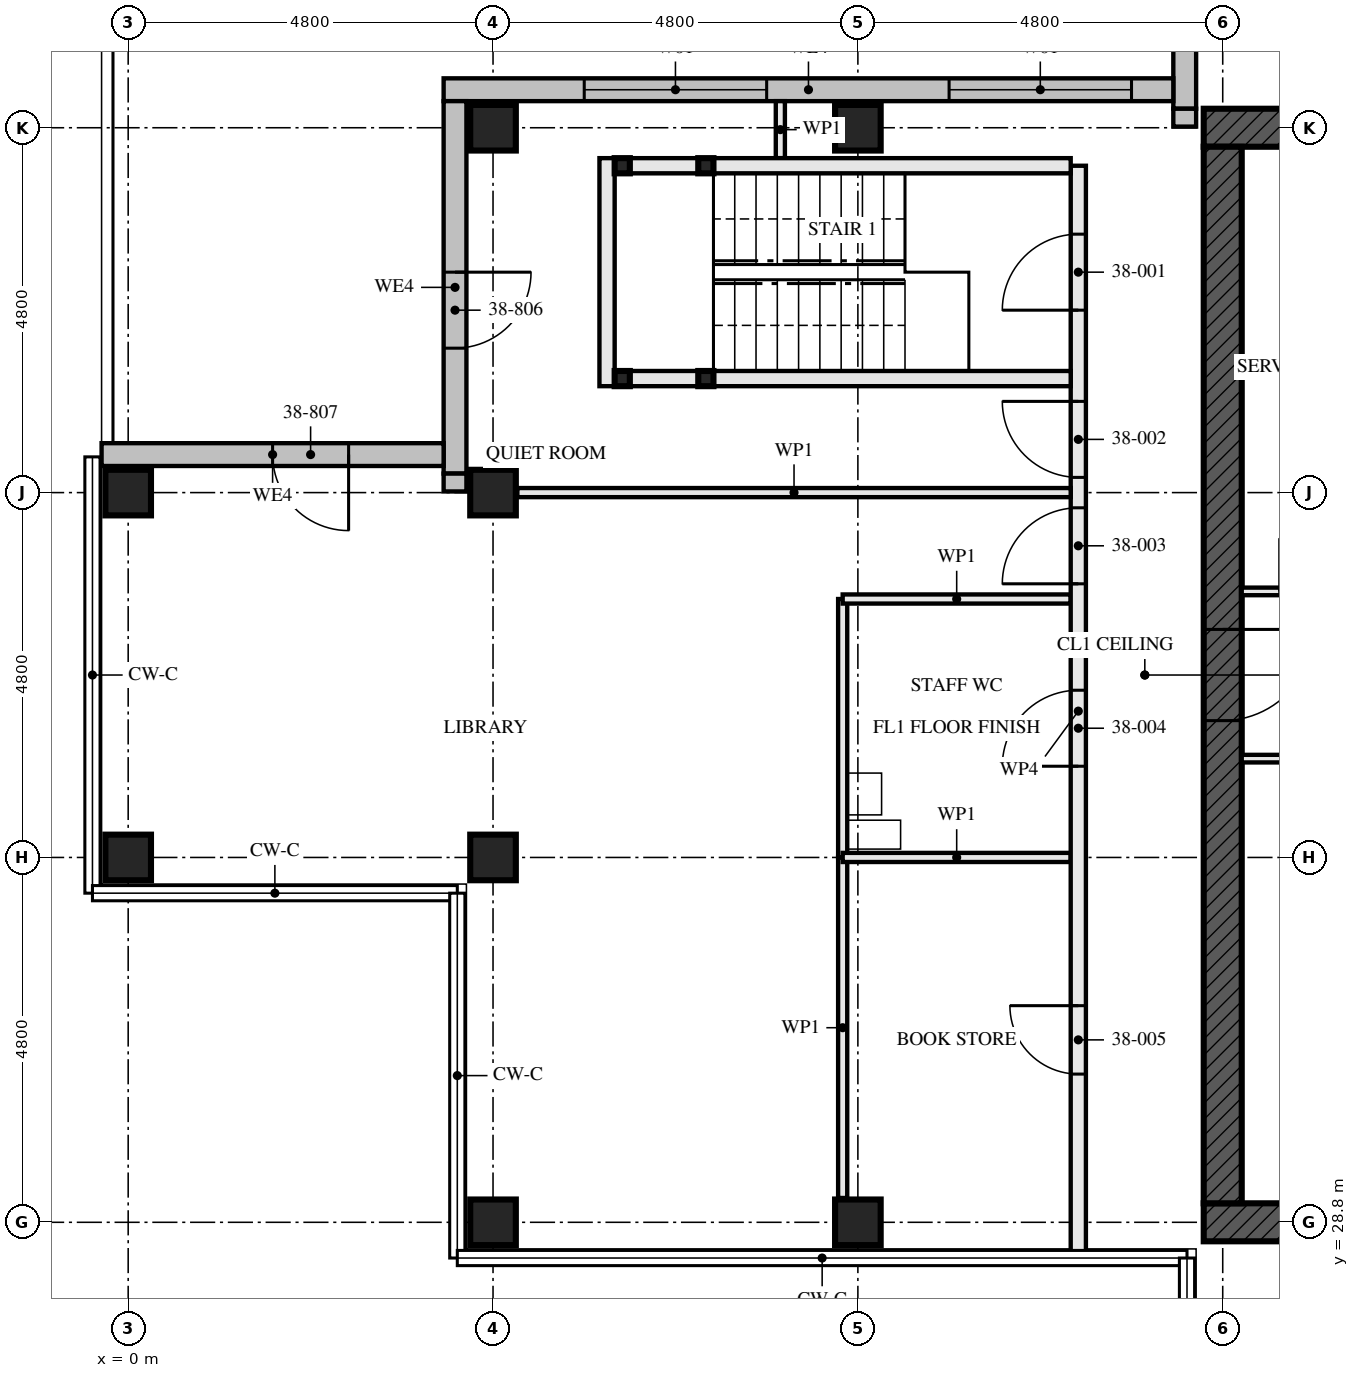
"""IFC4 building model, lengths in metres.
Left out: names, types, materials, properties, quantities, classifications, styles, units other than length and angle.
Written with IfcOpenShell. Run it as: python <this file> out.ifc"""

import sys

from ifc_helpers import new_model, si_unit, direction, frame, frame_2d, origin, origin_2d, place, context, subcontext, project, spatial, rectangle, hollow_rectangle, extrude, element, fill, save


model = new_model("IFC4")
c1 = context("Model", 3, precision=1e-05, world=origin(), true_north=direction((0.0, 1.0)))
c2 = subcontext(c1, "Body", "Model", "MODEL_VIEW")
j1 = project(units=[si_unit("LENGTHUNIT", "METRE"), si_unit("PLANEANGLEUNIT", "RADIAN")], contexts=[c1])
p1 = place(None, origin())
s1 = spatial("IfcSite", under=j1, at=p1, CompositionType="ELEMENT")
p2 = place(p1, origin())
s2 = spatial("IfcBuilding", under=s1, at=p2, CompositionType="ELEMENT")
p3 = place(p2, frame((0.0, 0.0, 141.0)))
s3 = spatial("IfcBuildingStorey", under=s2, at=p3, CompositionType="ELEMENT", Elevation=141.0)
for number, where, z_axis, x_axis in (
    (1, (0.0, 33.6, 0.0), (0.0, 0.0, 1.0), (0.0, 1.0, 0.0)),
    (2, (0.0, 38.4, 0.0), (0.0, 0.0, 1.0), (0.0, 1.0, 0.0)),
    (3, (4.8, 28.8, 0.0), (0.0, 0.0, 1.0), (0.0, 1.0, 0.0)),
    (4, (4.8, 33.6, 0.0), (0.0, 0.0, 1.0), (0.0, 1.0, 0.0)),
    (5, (4.8, 38.4, 0.0), (0.0, 0.0, 1.0), (0.0, 1.0, 0.0)),
    (6, (4.8, 43.2, 0.0), (0.0, 0.0, 1.0), (0.0, 1.0, 0.0)),
    (7, (9.6, 28.8, 0.0), (0.0, 0.0, 1.0), (0.0, 1.0, 0.0)),
    (8, (9.6, 43.2, 0.0), (0.0, 0.0, 1.0), (0.0, 1.0, 0.0)),
):
    element("IfcColumn", number, at=place(p3, frame(where, z_axis=z_axis, x_axis=x_axis)), inside=s3, PredefinedType="COLUMN", context=c2, shape_type="SweptSolid", body=[
        extrude(hollow_rectangle(XDim=0.6, YDim=0.6, WallThickness=0.08, at=origin_2d()), origin(), (0.0, 0.0, 1.0), 3.5),
    ])
p4 = place(p3, frame((14.15, 28.8, -0.17), z_axis=(0.0, 0.0, 1.0), x_axis=(1.0, 0.0, 0.0)))
e9 = element("IfcWall", 9, at=p4, inside=s3, PredefinedType="SHEAR", context=c2, shape_type="SweptSolid", body=[
    extrude(rectangle(XDim=14.9, YDim=0.5, at=frame_2d((7.45, 0.0))), origin(), (0.0, 0.0, 1.0), 3.5),
])
p5 = place(p4, frame((6.85, 0.0, 0.17)))
e10 = element("IfcOpeningElement", 10, at=p5, cuts=e9, PredefinedType="OPENING", context=c2, shape_type="SweptSolid", body=[
    extrude(rectangle(XDim=1.2, YDim=2.1, at=frame_2d((0.6, 1.05))), frame((0.0, 0.26, 0.0), z_axis=(0.0, -1.0, 0.0), x_axis=(1.0, 0.0, 0.0)), (0.0, 0.0, 1.0), 0.521),
])
p6 = place(p3, frame((29.05, 43.2, -0.17), z_axis=(0.0, 0.0, 1.0), x_axis=(-1.0, 0.0, 0.0)))
e11 = element("IfcWall", 11, at=p6, inside=s3, PredefinedType="SHEAR", context=c2, shape_type="SweptSolid", body=[
    extrude(rectangle(XDim=14.9, YDim=0.5, at=frame_2d((7.45, 0.0))), origin(), (0.0, 0.0, 1.0), 3.5),
])
p7 = place(p6, frame((6.85, 0.0, 0.17)))
e12 = element("IfcOpeningElement", 12, at=p7, cuts=e11, PredefinedType="OPENING", context=c2, shape_type="SweptSolid", body=[
    extrude(rectangle(XDim=1.2, YDim=2.1, at=frame_2d((0.6, 1.05))), frame((0.0, 0.26, 0.0), z_axis=(0.0, -1.0, 0.0), x_axis=(1.0, 0.0, 0.0)), (0.0, 0.0, 1.0), 0.521),
])
p8 = place(p3, frame((14.4, 42.95, -0.17), z_axis=(0.0, 0.0, 1.0), x_axis=(0.0, -1.0, 0.0)))
e13 = element("IfcWall", 13, at=p8, inside=s3, PredefinedType="SHEAR", context=c2, shape_type="SweptSolid", body=[
    extrude(rectangle(XDim=13.9, YDim=0.5, at=frame_2d((6.95, 0.0))), origin(), (0.0, 0.0, 1.0), 3.5),
])
p9 = place(p8, frame((6.35, 0.0, 0.17)))
e14 = element("IfcOpeningElement", 14, at=p9, cuts=e13, PredefinedType="OPENING", context=c2, shape_type="SweptSolid", body=[
    extrude(rectangle(XDim=1.2, YDim=2.1, at=frame_2d((0.6, 1.05))), frame((0.0, 0.26, 0.0), z_axis=(0.0, -1.0, 0.0), x_axis=(1.0, 0.0, 0.0)), (0.0, 0.0, 1.0), 0.521),
])
for number, where, z_axis, x_axis in (
    (15, (6.5, 42.7, 0.0), (0.0, 0.0, 1.0), (1.0, 0.0, 0.0)),
    (16, (6.5, 39.9, 0.0), (0.0, 0.0, 1.0), (1.0, 0.0, 0.0)),
    (17, (7.6, 42.7, 0.0), (0.0, 0.0, 1.0), (1.0, 0.0, 0.0)),
    (18, (7.6, 39.9, 0.0), (0.0, 0.0, 1.0), (1.0, 0.0, 0.0)),
):
    element("IfcColumn", number, at=place(p3, frame(where, z_axis=z_axis, x_axis=x_axis)), inside=s3, PredefinedType="COLUMN", context=c2, shape_type="SweptSolid", body=[
        extrude(hollow_rectangle(XDim=0.2, YDim=0.2, WallThickness=0.008, at=origin_2d()), origin(), (0.0, 0.0, 1.0), 3.33),
    ])
p10 = place(p3, frame((13.9, 53.15, 0.0), z_axis=(0.0, 0.0, 1.0), x_axis=(0.0, -1.0, 0.0)))
e19 = element("IfcWall", 19, at=p10, inside=s3, PredefinedType="SOLIDWALL", context=c2, shape_type="SweptSolid", body=[
    extrude(rectangle(XDim=9.7, YDim=0.3, at=frame_2d((4.85, 0.0))), origin(), (0.0, 0.0, 1.0), 3.5),
])
p11 = place(p10, frame((2.25, 0.0, 0.0)))
e20 = element("IfcOpeningElement", 20, at=p11, cuts=e19, PredefinedType="OPENING", context=c2, shape_type="SweptSolid", body=[
    extrude(rectangle(XDim=1.0, YDim=2.4, at=frame_2d((0.5, 1.2))), frame((0.0, 0.161, 0.0), z_axis=(0.0, -1.0, 0.0), x_axis=(1.0, 0.0, 0.0)), (0.0, 0.0, 1.0), 0.321),
])
p12 = place(p10, frame((6.35, 0.0, 0.6)))
e21 = element("IfcOpeningElement", 21, at=p12, cuts=e19, PredefinedType="OPENING", context=c2, shape_type="SweptSolid", body=[
    extrude(rectangle(XDim=2.4, YDim=1.8, at=frame_2d((1.2, 0.9))), frame((0.0, 0.161, 0.0), z_axis=(0.0, -1.0, 0.0), x_axis=(1.0, 0.0, 0.0)), (0.0, 0.0, 1.0), 0.321),
])
p13 = place(p3, frame((13.75, 43.7, 0.0), z_axis=(0.0, 0.0, 1.0), x_axis=(-1.0, 0.0, 0.0)))
e22 = element("IfcWall", 22, at=p13, inside=s3, PredefinedType="SOLIDWALL", context=c2, shape_type="SweptSolid", body=[
    extrude(rectangle(XDim=9.6, YDim=0.3, at=frame_2d((4.8, 0.0))), origin(), (0.0, 0.0, 1.0), 3.5),
])
p14 = place(p13, frame((5.35, 0.0, 0.6)))
e23 = element("IfcOpeningElement", 23, at=p14, cuts=e22, PredefinedType="OPENING", context=c2, shape_type="SweptSolid", body=[
    extrude(rectangle(XDim=2.4, YDim=1.8, at=frame_2d((1.2, 0.9))), frame((0.0, 0.161, 0.0), z_axis=(0.0, -1.0, 0.0), x_axis=(1.0, 0.0, 0.0)), (0.0, 0.0, 1.0), 0.321),
])
p15 = place(p13, frame((0.55, 0.0, 0.6)))
e24 = element("IfcOpeningElement", 24, at=p15, cuts=e22, PredefinedType="OPENING", context=c2, shape_type="SweptSolid", body=[
    extrude(rectangle(XDim=2.4, YDim=1.8, at=frame_2d((1.2, 0.9))), frame((0.0, 0.161, 0.0), z_axis=(0.0, -1.0, 0.0), x_axis=(1.0, 0.0, 0.0)), (0.0, 0.0, 1.0), 0.321),
])
p16 = place(p3, frame((4.3, 43.55, 0.0), z_axis=(0.0, 0.0, 1.0), x_axis=(0.0, -1.0, 0.0)))
e25 = element("IfcWall", 25, at=p16, inside=s3, PredefinedType="SOLIDWALL", context=c2, shape_type="SweptSolid", body=[
    extrude(rectangle(XDim=4.9, YDim=0.3, at=frame_2d((2.45, 0.0))), origin(), (0.0, 0.0, 1.0), 3.5),
])
p17 = place(p16, frame((2.25, 0.0, 0.0)))
e26 = element("IfcOpeningElement", 26, at=p17, cuts=e25, PredefinedType="OPENING", context=c2, shape_type="SweptSolid", body=[
    extrude(rectangle(XDim=1.0, YDim=2.4, at=frame_2d((0.5, 1.2))), frame((0.0, 0.161, 0.0), z_axis=(0.0, -1.0, 0.0), x_axis=(1.0, 0.0, 0.0)), (0.0, 0.0, 1.0), 0.321),
])
p18 = place(p3, frame((4.15, 38.9, 0.0), z_axis=(0.0, 0.0, 1.0), x_axis=(-1.0, 0.0, 0.0)))
e27 = element("IfcWall", 27, at=p18, inside=s3, PredefinedType="SOLIDWALL", context=c2, shape_type="SweptSolid", body=[
    extrude(rectangle(XDim=4.5, YDim=0.3, at=frame_2d((2.25, 0.0))), origin(), (0.0, 0.0, 1.0), 3.5),
])
p19 = place(p18, frame((1.25, 0.0, 0.0)))
e28 = element("IfcOpeningElement", 28, at=p19, cuts=e27, PredefinedType="OPENING", context=c2, shape_type="SweptSolid", body=[
    extrude(rectangle(XDim=1.0, YDim=2.4, at=frame_2d((0.5, 1.2))), frame((0.0, 0.161, 0.0), z_axis=(0.0, -1.0, 0.0), x_axis=(1.0, 0.0, 0.0)), (0.0, 0.0, 1.0), 0.321),
])
for number, where, z_axis, x_axis in (
    (29, (13.9, 43.45, 2.39), (0.0, 0.0, 1.0), (0.0, -1.0, 0.0)),
    (30, (4.3, 38.65, 2.39), (0.0, 0.0, 1.0), (0.0, -1.0, 0.0)),
):
    element("IfcWall", number, at=place(p3, frame(where, z_axis=z_axis, x_axis=x_axis)), inside=s3, PredefinedType="SOLIDWALL", context=c2, shape_type="SweptSolid", body=[
        extrude(rectangle(XDim=0.235, YDim=0.3, at=frame_2d((0.117, 0.0))), origin(), (0.0, 0.0, 1.0), 0.88),
    ])
p20 = place(p3, frame((6.6, 42.7, 0.0), z_axis=(0.0, 0.0, 1.0), x_axis=(1.0, 0.0, 0.0)))
e31 = element("IfcWall", 31, at=p20, inside=s3, PredefinedType="SOLIDWALL", context=c2, shape_type="SweptSolid", body=[
    extrude(rectangle(XDim=0.9, YDim=0.2, at=frame_2d((0.45, 0.0))), origin(), (0.0, 0.0, 1.0), 2.99),
])
p21 = place(p3, frame((7.7, 42.7, 0.0), z_axis=(0.0, 0.0, 1.0), x_axis=(1.0, 0.0, 0.0)))
e32 = element("IfcWall", 32, at=p21, inside=s3, PredefinedType="SOLIDWALL", context=c2, shape_type="SweptSolid", body=[
    extrude(rectangle(XDim=4.7, YDim=0.2, at=frame_2d((2.35, 0.0))), origin(), (0.0, 0.0, 1.0), 2.99),
])
p22 = place(p3, frame((6.6, 39.9, 0.0), z_axis=(0.0, 0.0, 1.0), x_axis=(1.0, 0.0, 0.0)))
e33 = element("IfcWall", 33, at=p22, inside=s3, PredefinedType="SOLIDWALL", context=c2, shape_type="SweptSolid", body=[
    extrude(rectangle(XDim=0.9, YDim=0.2, at=frame_2d((0.45, 0.0))), origin(), (0.0, 0.0, 1.0), 2.99),
])
p23 = place(p3, frame((7.7, 39.9, 0.0), z_axis=(0.0, 0.0, 1.0), x_axis=(1.0, 0.0, 0.0)))
e34 = element("IfcWall", 34, at=p23, inside=s3, PredefinedType="SOLIDWALL", context=c2, shape_type="SweptSolid", body=[
    extrude(rectangle(XDim=4.7, YDim=0.2, at=frame_2d((2.35, 0.0))), origin(), (0.0, 0.0, 1.0), 2.99),
])
p24 = place(p3, frame((6.3, 42.8, 0.0), z_axis=(0.0, 0.0, 1.0), x_axis=(0.0, -1.0, 0.0)))
e35 = element("IfcWall", 35, at=p24, inside=s3, PredefinedType="SOLIDWALL", context=c2, shape_type="SweptSolid", body=[
    extrude(rectangle(XDim=3.0, YDim=0.2, at=frame_2d((1.5, 0.0))), origin(), (0.0, 0.0, 1.0), 3.33),
])
p25 = place(p3, frame((9.4, 37.0, 0.0), z_axis=(0.0, 0.0, 1.0), x_axis=(1.0, 0.0, 0.0)))
e36 = element("IfcWall", 36, at=p25, inside=s3, PredefinedType="PARTITIONING", context=c2, shape_type="SweptSolid", body=[
    extrude(rectangle(XDim=3.0, YDim=0.12, at=frame_2d((1.5, 0.0))), origin(), (0.0, 0.0, 1.0), 3.33),
])
p26 = place(p3, frame((9.4, 37.0, 0.0), z_axis=(0.0, 0.0, 1.0), x_axis=(0.0, -1.0, 0.0)))
e37 = element("IfcWall", 37, at=p26, inside=s3, PredefinedType="PARTITIONING", context=c2, shape_type="SweptSolid", body=[
    extrude(rectangle(XDim=3.4, YDim=0.12, at=frame_2d((1.7, 0.0))), origin(), (0.0, 0.0, 1.0), 3.33),
])
p27 = place(p3, frame((9.4, 33.6, 0.0), z_axis=(0.0, 0.0, 1.0), x_axis=(1.0, 0.0, 0.0)))
e38 = element("IfcWall", 38, at=p27, inside=s3, PredefinedType="PARTITIONING", context=c2, shape_type="SweptSolid", body=[
    extrude(rectangle(XDim=3.0, YDim=0.12, at=frame_2d((1.5, 0.0))), origin(), (0.0, 0.0, 1.0), 2.55),
])
p28 = place(p3, frame((9.4, 33.6, 0.0), z_axis=(0.0, 0.0, 1.0), x_axis=(0.0, -1.0, 0.0)))
e39 = element("IfcWall", 39, at=p28, inside=s3, PredefinedType="PARTITIONING", context=c2, shape_type="SweptSolid", body=[
    extrude(rectangle(XDim=4.48, YDim=0.12, at=frame_2d((2.24, 0.0))), origin(), (0.0, 0.0, 1.0), 3.33),
])
p29 = place(p3, frame((5.12, 38.4, 0.0), z_axis=(0.0, 0.0, 1.0), x_axis=(1.0, 0.0, 0.0)))
e40 = element("IfcWall", 40, at=p29, inside=s3, PredefinedType="PARTITIONING", context=c2, shape_type="SweptSolid", body=[
    extrude(rectangle(XDim=7.28, YDim=0.12, at=frame_2d((3.64, 0.0))), origin(), (0.0, 0.0, 1.0), 2.55),
])
p30 = place(p3, frame((8.58, 43.55, 0.0), z_axis=(0.0, 0.0, 1.0), x_axis=(0.0, -1.0, 0.0)))
e41 = element("IfcWall", 41, at=p30, inside=s3, PredefinedType="PARTITIONING", context=c2, shape_type="SweptSolid", body=[
    extrude(rectangle(XDim=0.75, YDim=0.12, at=frame_2d((0.375, 0.0))), origin(), (0.0, 0.0, 1.0), 2.32),
])
p31 = place(p3, frame((12.5, 42.7, 0.0), z_axis=(0.0, 0.0, 1.0), x_axis=(0.0, -1.0, 0.0)))
e42 = element("IfcWall", 42, at=p31, inside=s3, PredefinedType="PARTITIONING", context=c2, shape_type="SweptSolid", body=[
    extrude(rectangle(XDim=14.35, YDim=0.2, at=frame_2d((7.175, 0.0))), origin(), (0.0, 0.0, 1.0), 2.32),
])
p32 = place(p31, frame((0.9, 0.0, 0.0)))
e43 = element("IfcOpeningElement", 43, at=p32, cuts=e42, PredefinedType="OPENING", context=c2, shape_type="SweptSolid", body=[
    extrude(rectangle(XDim=1.0, YDim=2.1, at=frame_2d((0.5, 1.05))), frame((0.0, 0.111, 0.0), z_axis=(0.0, -1.0, 0.0), x_axis=(1.0, 0.0, 0.0)), (0.0, 0.0, 1.0), 0.221),
])
p33 = place(p31, frame((3.1, 0.0, 0.0)))
e44 = element("IfcOpeningElement", 44, at=p33, cuts=e42, PredefinedType="OPENING", context=c2, shape_type="SweptSolid", body=[
    extrude(rectangle(XDim=1.0, YDim=2.0, at=frame_2d((0.5, 1.0))), frame((0.0, 0.111, 0.0), z_axis=(0.0, -1.0, 0.0), x_axis=(1.0, 0.0, 0.0)), (0.0, 0.0, 1.0), 0.221),
])
p34 = place(p31, frame((4.5, 0.0, 0.0)))
e45 = element("IfcOpeningElement", 45, at=p34, cuts=e42, PredefinedType="OPENING", context=c2, shape_type="SweptSolid", body=[
    extrude(rectangle(XDim=1.0, YDim=2.0, at=frame_2d((0.5, 1.0))), frame((0.0, 0.111, 0.0), z_axis=(0.0, -1.0, 0.0), x_axis=(1.0, 0.0, 0.0)), (0.0, 0.0, 1.0), 0.221),
])
p35 = place(p31, frame((6.9, 0.0, 0.0)))
e46 = element("IfcOpeningElement", 46, at=p35, cuts=e42, PredefinedType="OPENING", context=c2, shape_type="SweptSolid", body=[
    extrude(rectangle(XDim=1.0, YDim=2.1, at=frame_2d((0.5, 1.05))), frame((0.0, 0.111, 0.0), z_axis=(0.0, -1.0, 0.0), x_axis=(1.0, 0.0, 0.0)), (0.0, 0.0, 1.0), 0.221),
])
p36 = place(p31, frame((11.05, 0.0, 0.0)))
e47 = element("IfcOpeningElement", 47, at=p36, cuts=e42, PredefinedType="OPENING", context=c2, shape_type="SweptSolid", body=[
    extrude(rectangle(XDim=0.9, YDim=2.1, at=frame_2d((0.45, 1.05))), frame((0.0, 0.111, 0.0), z_axis=(0.0, -1.0, 0.0), x_axis=(1.0, 0.0, 0.0)), (0.0, 0.0, 1.0), 0.221),
])
p37 = place(p3, frame((14.65, 34.9, 0.0), z_axis=(0.0, 0.0, 1.0), x_axis=(1.0, 0.0, 0.0)))
e48 = element("IfcWall", 48, at=p37, inside=s3, PredefinedType="SOLIDWALL", context=c2, shape_type="SweptSolid", body=[
    extrude(rectangle(XDim=5.9, YDim=0.1, at=frame_2d((2.95, 0.0))), origin(), (0.0, 0.0, 1.0), 3.33),
])
p38 = place(p37, frame((1.6, 0.0, 0.0)))
e49 = element("IfcOpeningElement", 49, at=p38, cuts=e48, PredefinedType="OPENING", context=c2, shape_type="SweptSolid", body=[
    extrude(rectangle(XDim=0.7, YDim=2.1, at=frame_2d((0.35, 1.05))), frame((0.0, 0.061, 0.0), z_axis=(0.0, -1.0, 0.0), x_axis=(1.0, 0.0, 0.0)), (0.0, 0.0, 1.0), 0.121),
])
p39 = place(p3, frame((14.65, 37.1, 0.0), z_axis=(0.0, 0.0, 1.0), x_axis=(1.0, 0.0, 0.0)))
e50 = element("IfcWall", 50, at=p39, inside=s3, PredefinedType="SOLIDWALL", context=c2, shape_type="SweptSolid", body=[
    extrude(rectangle(XDim=5.9, YDim=0.1, at=frame_2d((2.95, 0.0))), origin(), (0.0, 0.0, 1.0), 3.33),
])
p40 = place(p39, frame((0.5, 0.0, 0.0)))
e51 = element("IfcOpeningElement", 51, at=p40, cuts=e50, PredefinedType="OPENING", context=c2, shape_type="SweptSolid", body=[
    extrude(rectangle(XDim=0.7, YDim=2.1, at=frame_2d((0.35, 1.05))), frame((0.0, 0.061, 0.0), z_axis=(0.0, -1.0, 0.0), x_axis=(1.0, 0.0, 0.0)), (0.0, 0.0, 1.0), 0.121),
])
p41 = place(p39, frame((1.9, 0.0, 0.0)))
e52 = element("IfcOpeningElement", 52, at=p41, cuts=e50, PredefinedType="OPENING", context=c2, shape_type="SweptSolid", body=[
    extrude(rectangle(XDim=0.9, YDim=2.1, at=frame_2d((0.45, 1.05))), frame((0.0, 0.061, 0.0), z_axis=(0.0, -1.0, 0.0), x_axis=(1.0, 0.0, 0.0)), (0.0, 0.0, 1.0), 0.121),
])
p42 = place(p14, origin())
e53 = element("IfcWindow", 53, at=p42, inside=s3, PartitioningType="SINGLE_PANEL", PredefinedType="WINDOW", context=c2, shape_type="SweptSolid", body=[
    extrude(rectangle(XDim=2.4, YDim=1.8, at=frame_2d((1.2, 0.9))), frame((0.0, 0.03, 0.0), z_axis=(0.0, -1.0, 0.0), x_axis=(1.0, 0.0, 0.0)), (0.0, 0.0, 1.0), 0.06),
])
fill(e23, e53)
p43 = place(p15, origin())
e54 = element("IfcWindow", 54, at=p43, inside=s3, PartitioningType="SINGLE_PANEL", PredefinedType="WINDOW", context=c2, shape_type="SweptSolid", body=[
    extrude(rectangle(XDim=2.4, YDim=1.8, at=frame_2d((1.2, 0.9))), frame((0.0, 0.03, 0.0), z_axis=(0.0, -1.0, 0.0), x_axis=(1.0, 0.0, 0.0)), (0.0, 0.0, 1.0), 0.06),
])
fill(e24, e54)
p44 = place(p17, origin())
e55 = element("IfcDoor", 55, at=p44, inside=s3, OperationType="SINGLE_SWING_LEFT", PredefinedType="DOOR", context=c2, shape_type="SweptSolid", body=[
    extrude(rectangle(XDim=1.0, YDim=2.4, at=frame_2d((0.5, 1.2))), frame((0.0, 0.035, 0.0), z_axis=(0.0, -1.0, 0.0), x_axis=(1.0, 0.0, 0.0)), (0.0, 0.0, 1.0), 0.07),
])
fill(e26, e55)
p45 = place(p19, origin())
e56 = element("IfcDoor", 56, at=p45, inside=s3, OperationType="SINGLE_SWING_LEFT", PredefinedType="DOOR", context=c2, shape_type="SweptSolid", body=[
    extrude(rectangle(XDim=1.0, YDim=2.4, at=frame_2d((0.5, 1.2))), frame((0.0, 0.035, 0.0), z_axis=(0.0, -1.0, 0.0), x_axis=(1.0, 0.0, 0.0)), (0.0, 0.0, 1.0), 0.07),
])
fill(e28, e56)
p46 = place(p32, frame((1.0, 0.0, 0.0), z_axis=(0.0, 0.0, 1.0), x_axis=(-1.0, 0.0, 0.0)))
e57 = element("IfcDoor", 57, at=p46, inside=s3, OperationType="SINGLE_SWING_RIGHT", PredefinedType="DOOR", context=c2, shape_type="SweptSolid", body=[
    extrude(rectangle(XDim=1.0, YDim=2.1, at=frame_2d((0.5, 1.05))), frame((0.0, 0.032, 0.0), z_axis=(0.0, -1.0, 0.0), x_axis=(1.0, 0.0, 0.0)), (0.0, 0.0, 1.0), 0.064),
])
fill(e43, e57)
p47 = place(p33, frame((1.0, 0.0, 0.0), z_axis=(0.0, 0.0, 1.0), x_axis=(-1.0, 0.0, 0.0)))
e58 = element("IfcDoor", 58, at=p47, inside=s3, OperationType="SINGLE_SWING_LEFT", PredefinedType="DOOR", context=c2, shape_type="SweptSolid", body=[
    extrude(rectangle(XDim=1.0, YDim=2.0, at=frame_2d((0.5, 1.0))), frame((0.0, 0.027, 0.0), z_axis=(0.0, -1.0, 0.0), x_axis=(1.0, 0.0, 0.0)), (0.0, 0.0, 1.0), 0.054),
])
fill(e44, e58)
p48 = place(p34, frame((1.0, 0.0, 0.0), z_axis=(0.0, 0.0, 1.0), x_axis=(-1.0, 0.0, 0.0)))
e59 = element("IfcDoor", 59, at=p48, inside=s3, OperationType="SINGLE_SWING_RIGHT", PredefinedType="DOOR", context=c2, shape_type="SweptSolid", body=[
    extrude(rectangle(XDim=1.0, YDim=2.0, at=frame_2d((0.5, 1.0))), frame((0.0, 0.027, 0.0), z_axis=(0.0, -1.0, 0.0), x_axis=(1.0, 0.0, 0.0)), (0.0, 0.0, 1.0), 0.054),
])
fill(e45, e59)
p49 = place(p35, frame((1.0, 0.0, 0.0), z_axis=(0.0, 0.0, 1.0), x_axis=(-1.0, 0.0, 0.0)))
e60 = element("IfcDoor", 60, at=p49, inside=s3, OperationType="SINGLE_SWING_RIGHT", PredefinedType="DOOR", context=c2, shape_type="SweptSolid", body=[
    extrude(rectangle(XDim=1.0, YDim=2.1, at=frame_2d((0.5, 1.05))), frame((0.0, 0.027, 0.0), z_axis=(0.0, -1.0, 0.0), x_axis=(1.0, 0.0, 0.0)), (0.0, 0.0, 1.0), 0.054),
])
fill(e46, e60)
p50 = place(p36, frame((0.9, 0.0, 0.0), z_axis=(0.0, 0.0, 1.0), x_axis=(-1.0, 0.0, 0.0)))
e61 = element("IfcDoor", 61, at=p50, inside=s3, OperationType="SINGLE_SWING_LEFT", PredefinedType="DOOR", context=c2, shape_type="SweptSolid", body=[
    extrude(rectangle(XDim=0.9, YDim=2.1, at=frame_2d((0.45, 1.05))), frame((0.0, 0.027, 0.0), z_axis=(0.0, -1.0, 0.0), x_axis=(1.0, 0.0, 0.0)), (0.0, 0.0, 1.0), 0.054),
])
fill(e47, e61)
p51 = place(p9, origin())
e62 = element("IfcDoor", 62, at=p51, inside=s3, OperationType="SINGLE_SWING_LEFT", PredefinedType="DOOR", context=c2, shape_type="SweptSolid", body=[
    extrude(rectangle(XDim=1.2, YDim=2.1, at=frame_2d((0.6, 1.05))), frame((0.0, 0.027, 0.0), z_axis=(0.0, -1.0, 0.0), x_axis=(1.0, 0.0, 0.0)), (0.0, 0.0, 1.0), 0.054),
])
fill(e14, e62)
save(model, sys.argv[1])
